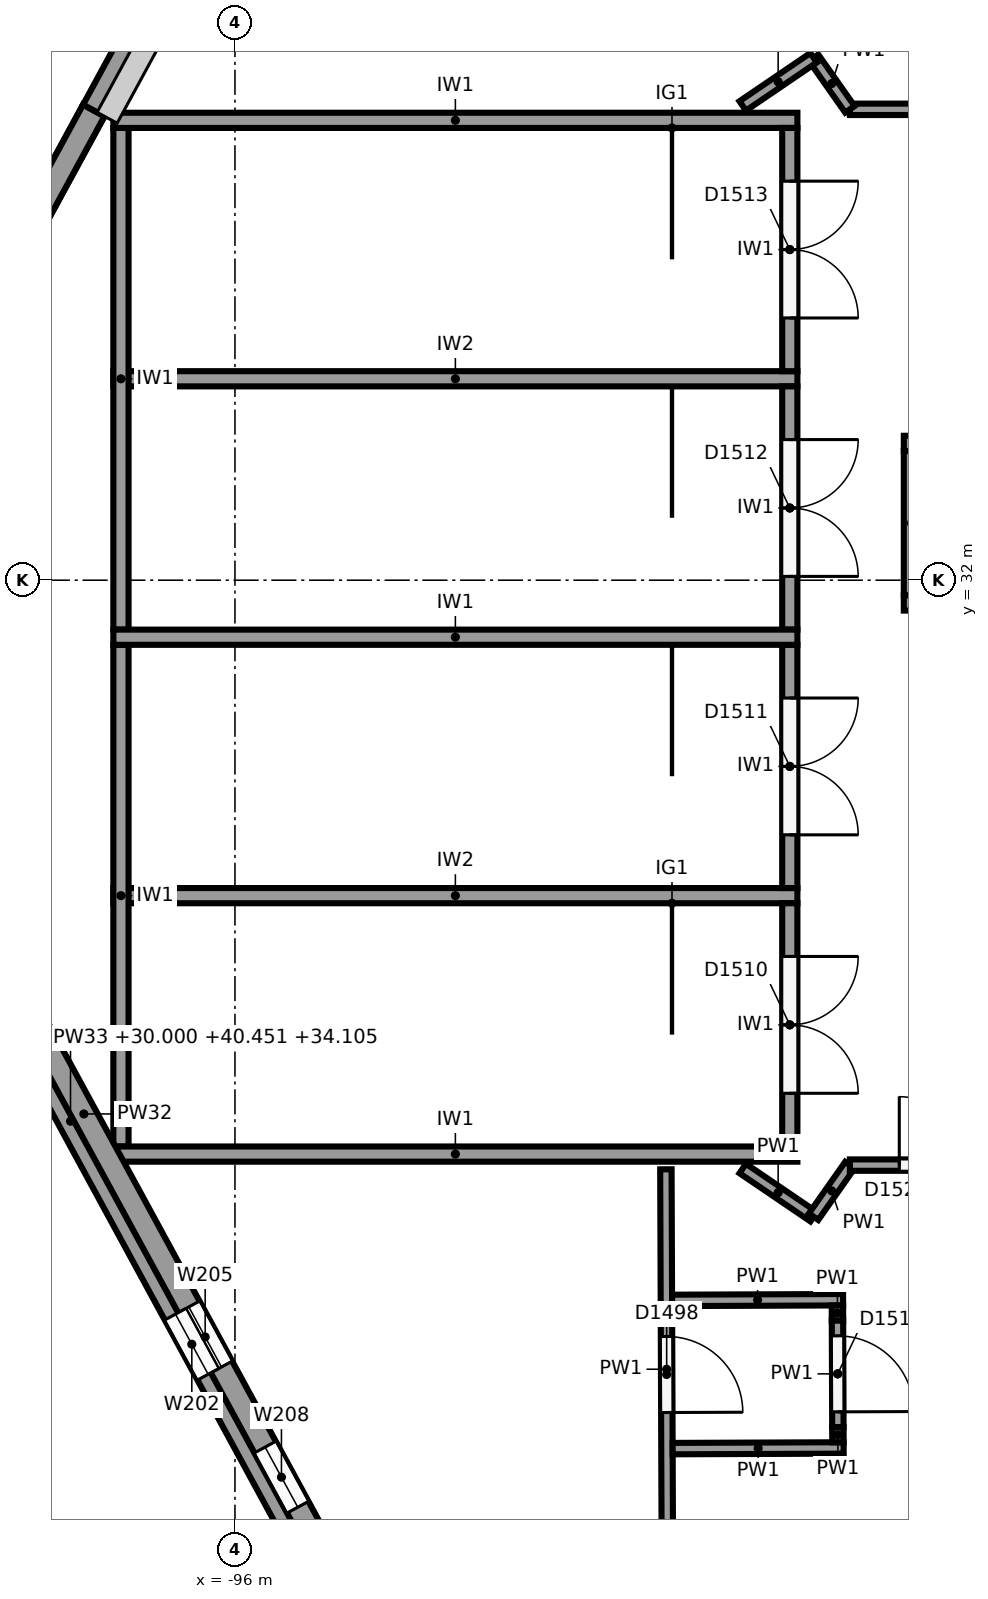
"""IFC4 building model, lengths in metres.
Left out: names, types, materials, properties, quantities, classifications, styles, units other than length and angle.
Written with IfcOpenShell. Run it as: python <this file> out.ifc"""

import sys

from ifc_helpers import new_model, si_unit, direction, frame, frame_2d, origin, place, context, subcontext, project, spatial, polyline, rectangle, outline, extrude, element, fill, save


model = new_model("IFC4")
c1 = context("Model", 3, precision=1e-05, world=origin(), true_north=direction((0.0, 1.0)))
c2 = subcontext(c1, "Body", "Model", "MODEL_VIEW")
j1 = project(units=[si_unit("LENGTHUNIT", "METRE"), si_unit("PLANEANGLEUNIT", "RADIAN")], contexts=[c1])
p1 = place(None, origin())
s1 = spatial("IfcSite", under=j1, at=p1, CompositionType="ELEMENT")
p2 = place(p1, origin())
s2 = spatial("IfcBuilding", under=s1, at=p2, CompositionType="ELEMENT")
p3 = place(p2, frame((0.0, 0.0, 24.0)))
s3 = spatial("IfcBuildingStorey", under=s2, at=p3, CompositionType="ELEMENT", Elevation=24.0)
p4 = place(p3, frame((-101.337, 31.785, 0.0), z_axis=(0.0, 0.0, 1.0), x_axis=(0.477865020076, 0.878433277255, 0.0)))
e1 = element("IfcWall", 1, at=p4, inside=s3, PredefinedType="SOLIDWALL", context=c2, shape_type="SweptSolid", body=[
    extrude(rectangle(XDim=7.28, YDim=0.32, at=frame_2d((3.64, 0.0))), origin(), (0.0, 0.0, 1.0), 6.0),
])
p5 = place(p4, frame((1.13, 0.0, 1.0)))
e2 = element("IfcOpeningElement", 2, at=p5, cuts=e1, PredefinedType="OPENING", context=c2, shape_type="SweptSolid", body=[
    extrude(rectangle(XDim=0.9, YDim=3.25, at=frame_2d((0.45, 1.625))), frame((0.0, 0.17, 0.0), z_axis=(0.0, -1.0, 0.0), x_axis=(1.0, 0.0, 0.0)), (0.0, 0.0, 1.0), 0.34),
])
p6 = place(p3, frame((-101.337, 31.785, 6.0), z_axis=(0.0, 0.0, 1.0), x_axis=(0.477865020076, 0.878433277255, 0.0)))
e3 = element("IfcWall", 3, at=p6, inside=s3, PredefinedType="SOLIDWALL", context=c2, shape_type="SweptSolid", body=[
    extrude(outline(polyline([(0.0, 0.0), (7.28, 0.0), (7.28, 6.972), (0.0, 10.451), (0.0, 0.0)])), frame((0.0, 0.16, 0.0), z_axis=(0.0, -1.0, 0.0), x_axis=(1.0, 0.0, 0.0)), (0.0, 0.0, 1.0), 0.32),
])
p7 = place(p6, frame((1.13, 0.0, 1.6)))
e4 = element("IfcOpeningElement", 4, at=p7, cuts=e3, PredefinedType="OPENING", context=c2, shape_type="SweptSolid", body=[
    extrude(rectangle(XDim=0.9, YDim=3.0, at=frame_2d((0.45, 1.5))), frame((0.0, 0.17, 0.0), z_axis=(0.0, -1.0, 0.0), x_axis=(1.0, 0.0, 0.0)), (0.0, 0.0, 1.0), 0.34),
])
p8 = place(p3, frame((-97.858, 38.18, 5.65), z_axis=(0.0, 0.0, 1.0), x_axis=(0.477871109227, 0.878429964747, 0.0)))
e5 = element("IfcWall", 5, at=p8, inside=s3, PredefinedType="SOLIDWALL", context=c2, shape_type="SweptSolid", body=[
    extrude(outline(polyline([(0.0, 0.0), (6.0, 0.0), (6.0, 4.455), (0.0, 7.322), (0.0, 0.0)])), frame((0.0, 0.16, 0.0), z_axis=(0.0, -1.0, 0.0), x_axis=(1.0, 0.0, 0.0)), (0.0, 0.0, 1.0), 0.32),
])
p9 = place(p3, frame((-94.815, 19.145, 0.0), z_axis=(0.0, 0.0, 1.0), x_axis=(-0.477867771117, 0.878431780691, 0.0)))
e6 = element("IfcWall", 6, at=p9, inside=s3, PredefinedType="SOLIDWALL", context=c2, shape_type="SweptSolid", body=[
    extrude(rectangle(XDim=13.28, YDim=0.32, at=frame_2d((6.64, 0.0))), origin(), (0.0, 0.0, 1.0), 6.0),
])
p10 = place(p9, frame((0.75, 0.0, 1.0)))
e7 = element("IfcOpeningElement", 7, at=p10, cuts=e6, PredefinedType="OPENING", context=c2, shape_type="SweptSolid", body=[
    extrude(rectangle(XDim=0.9, YDim=3.25, at=frame_2d((0.45, 1.625))), frame((0.0, 0.17, 0.0), z_axis=(0.0, -1.0, 0.0), x_axis=(1.0, 0.0, 0.0)), (0.0, 0.0, 1.0), 0.34),
])
p11 = place(p9, frame((2.85, 0.0, 1.0)))
e8 = element("IfcOpeningElement", 8, at=p11, cuts=e6, PredefinedType="OPENING", context=c2, shape_type="SweptSolid", body=[
    extrude(rectangle(XDim=0.9, YDim=3.25, at=frame_2d((0.45, 1.625))), frame((0.0, 0.17, 0.0), z_axis=(0.0, -1.0, 0.0), x_axis=(1.0, 0.0, 0.0)), (0.0, 0.0, 1.0), 0.34),
])
p12 = place(p9, frame((11.25, 0.0, 1.0)))
e9 = element("IfcOpeningElement", 9, at=p12, cuts=e6, PredefinedType="OPENING", context=c2, shape_type="SweptSolid", body=[
    extrude(rectangle(XDim=0.9, YDim=3.25, at=frame_2d((0.45, 1.625))), frame((0.0, 0.17, 0.0), z_axis=(0.0, -1.0, 0.0), x_axis=(1.0, 0.0, 0.0)), (0.0, 0.0, 1.0), 0.34),
])
p13 = place(p3, frame((-94.991, 19.05, 6.0), z_axis=(0.0, 0.0, 1.0), x_axis=(-0.477867771117, 0.878431780691, 0.0)))
e10 = element("IfcWall", 10, at=p13, inside=s3, PredefinedType="SOLIDWALL", context=c2, shape_type="SweptSolid", body=[
    extrude(outline(polyline([(0.0, 0.0), (13.28, 0.0), (13.28, 10.451), (0.0, 4.105), (0.0, 0.0)])), frame((0.0, 0.16, 0.0), z_axis=(0.0, -1.0, 0.0), x_axis=(1.0, 0.0, 0.0)), (0.0, 0.0, 1.0), 0.32),
])
p14 = place(p13, frame((2.85, 0.0, 1.6)))
e11 = element("IfcOpeningElement", 11, at=p14, cuts=e10, PredefinedType="OPENING", context=c2, shape_type="SweptSolid", body=[
    extrude(rectangle(XDim=0.9, YDim=3.0, at=frame_2d((0.45, 1.5))), frame((0.0, 0.17, 0.0), z_axis=(0.0, -1.0, 0.0), x_axis=(1.0, 0.0, 0.0)), (0.0, 0.0, 1.0), 0.34),
])
p15 = place(p13, frame((11.25, 0.0, 1.6)))
e12 = element("IfcOpeningElement", 12, at=p15, cuts=e10, PredefinedType="OPENING", context=c2, shape_type="SweptSolid", body=[
    extrude(rectangle(XDim=0.9, YDim=3.0, at=frame_2d((0.45, 1.5))), frame((0.0, 0.17, 0.0), z_axis=(0.0, -1.0, 0.0), x_axis=(1.0, 0.0, 0.0)), (0.0, 0.0, 1.0), 0.34),
])
for number, where, z_axis, x_axis in (
    (13, (-97.6, 38.05, 0.0), (0.0, 0.0, 1.0), (1.0, 0.0, 0.0)),
    (14, (-97.6, 31.25, 0.0), (0.0, 0.0, 1.0), (1.0, 0.0, 0.0)),
    (15, (-97.6, 24.45, 0.0), (0.0, 0.0, 1.0), (1.0, 0.0, 0.0)),
):
    element("IfcWall", number, at=place(p3, frame(where, z_axis=z_axis, x_axis=x_axis)), inside=s3, PredefinedType="SHEAR", context=c2, shape_type="SweptSolid", body=[
        extrude(rectangle(XDim=9.0, YDim=0.2, at=frame_2d((4.5, 0.0))), origin(), (0.0, 0.0, 1.0), 5.75),
    ])
for number, where, z_axis, x_axis in (
    (16, (-97.5, 37.95, 0.0), (0.0, 0.0, 1.0), (0.0, -1.0, 0.0)),
    (17, (-97.5, 31.15, 0.0), (0.0, 0.0, 1.0), (0.0, -1.0, 0.0)),
):
    element("IfcWall", number, at=place(p3, frame(where, z_axis=z_axis, x_axis=x_axis)), inside=s3, PredefinedType="SHEAR", context=c2, shape_type="SweptSolid", body=[
        extrude(rectangle(XDim=6.6, YDim=0.2, at=frame_2d((3.3, 0.0))), origin(), (0.0, 0.0, 1.0), 5.75),
    ])
for number, where, z_axis, x_axis in (
    (18, (-97.6, 34.65, 0.0), (0.0, 0.0, 1.0), (1.0, 0.0, 0.0)),
    (19, (-97.6, 27.85, 0.0), (0.0, 0.0, 1.0), (1.0, 0.0, 0.0)),
):
    element("IfcWall", number, at=place(p3, frame(where, z_axis=z_axis, x_axis=x_axis)), inside=s3, PredefinedType="SHEAR", context=c2, shape_type="SweptSolid", body=[
        extrude(rectangle(XDim=9.0, YDim=0.2, at=frame_2d((4.5, 0.0))), origin(), (0.0, 0.0, 1.0), 5.75),
    ])
p16 = place(p3, frame((-88.7, 37.95, 0.0), z_axis=(0.0, 0.0, 1.0), x_axis=(0.0, -1.0, 0.0)))
e20 = element("IfcWall", 20, at=p16, inside=s3, PredefinedType="SHEAR", context=c2, shape_type="SweptSolid", body=[
    extrude(rectangle(XDim=3.2, YDim=0.2, at=frame_2d((1.6, 0.0))), origin(), (0.0, 0.0, 1.0), 5.75),
])
p17 = place(p16, frame((0.7, 0.0, 0.0)))
e21 = element("IfcOpeningElement", 21, at=p17, cuts=e20, PredefinedType="OPENING", context=c2, shape_type="SweptSolid", body=[
    extrude(rectangle(XDim=1.8, YDim=2.1, at=frame_2d((0.9, 1.05))), frame((0.0, 0.11, 0.0), z_axis=(0.0, -1.0, 0.0), x_axis=(1.0, 0.0, 0.0)), (0.0, 0.0, 1.0), 0.22),
])
p18 = place(p3, frame((-88.7, 34.55, 0.0), z_axis=(0.0, 0.0, 1.0), x_axis=(0.0, -1.0, 0.0)))
e22 = element("IfcWall", 22, at=p18, inside=s3, PredefinedType="SHEAR", context=c2, shape_type="SweptSolid", body=[
    extrude(rectangle(XDim=3.2, YDim=0.2, at=frame_2d((1.6, 0.0))), origin(), (0.0, 0.0, 1.0), 5.75),
])
p19 = place(p18, frame((0.7, 0.0, 0.0)))
e23 = element("IfcOpeningElement", 23, at=p19, cuts=e22, PredefinedType="OPENING", context=c2, shape_type="SweptSolid", body=[
    extrude(rectangle(XDim=1.8, YDim=2.1, at=frame_2d((0.9, 1.05))), frame((0.0, 0.11, 0.0), z_axis=(0.0, -1.0, 0.0), x_axis=(1.0, 0.0, 0.0)), (0.0, 0.0, 1.0), 0.22),
])
p20 = place(p3, frame((-88.7, 31.15, 0.0), z_axis=(0.0, 0.0, 1.0), x_axis=(0.0, -1.0, 0.0)))
e24 = element("IfcWall", 24, at=p20, inside=s3, PredefinedType="SHEAR", context=c2, shape_type="SweptSolid", body=[
    extrude(rectangle(XDim=3.2, YDim=0.2, at=frame_2d((1.6, 0.0))), origin(), (0.0, 0.0, 1.0), 5.75),
])
p21 = place(p20, frame((0.7, 0.0, 0.0)))
e25 = element("IfcOpeningElement", 25, at=p21, cuts=e24, PredefinedType="OPENING", context=c2, shape_type="SweptSolid", body=[
    extrude(rectangle(XDim=1.8, YDim=2.1, at=frame_2d((0.9, 1.05))), frame((0.0, 0.11, 0.0), z_axis=(0.0, -1.0, 0.0), x_axis=(1.0, 0.0, 0.0)), (0.0, 0.0, 1.0), 0.22),
])
p22 = place(p3, frame((-88.7, 27.75, 0.0), z_axis=(0.0, 0.0, 1.0), x_axis=(0.0, -1.0, 0.0)))
e26 = element("IfcWall", 26, at=p22, inside=s3, PredefinedType="SHEAR", context=c2, shape_type="SweptSolid", body=[
    extrude(rectangle(XDim=3.2, YDim=0.2, at=frame_2d((1.6, 0.0))), origin(), (0.0, 0.0, 1.0), 5.75),
])
p23 = place(p22, frame((0.7, 0.0, 0.0)))
e27 = element("IfcOpeningElement", 27, at=p23, cuts=e26, PredefinedType="OPENING", context=c2, shape_type="SweptSolid", body=[
    extrude(rectangle(XDim=1.8, YDim=2.1, at=frame_2d((0.9, 1.05))), frame((0.0, 0.11, 0.0), z_axis=(0.0, -1.0, 0.0), x_axis=(1.0, 0.0, 0.0)), (0.0, 0.0, 1.0), 0.22),
])
for number, where, z_axis, x_axis in (
    (28, (-87.2, 33.8, 0.0), (0.0, 0.0, 1.0), (1.0, 0.0, 0.0)),
    (29, (-87.2, 31.7, 0.0), (0.0, 0.0, 1.0), (1.0, 0.0, 0.0)),
):
    element("IfcWall", number, at=place(p3, frame(where, z_axis=z_axis, x_axis=x_axis)), inside=s3, PredefinedType="SHEAR", context=c2, shape_type="SweptSolid", body=[
        extrude(rectangle(XDim=3.0, YDim=0.2, at=frame_2d((1.5, 0.0))), origin(), (0.0, 0.0, 1.0), 4.6),
    ])
p24 = place(p3, frame((-87.1, 33.7, 0.0), z_axis=(0.0, 0.0, 1.0), x_axis=(0.0, -1.0, 0.0)))
e30 = element("IfcWall", 30, at=p24, inside=s3, PredefinedType="SHEAR", context=c2, shape_type="SweptSolid", body=[
    extrude(rectangle(XDim=1.9, YDim=0.2, at=frame_2d((0.95, 0.0))), origin(), (0.0, 0.0, 1.0), 4.6),
])
p25 = place(p3, frame((-90.33, 24.25, 0.0), z_axis=(0.0, 0.0, 1.0), x_axis=(0.003805253437, -0.999992759997, 0.0)))
e31 = element("IfcWall", 31, at=p25, inside=s3, PredefinedType="PARTITIONING", context=c2, shape_type="SweptSolid", body=[
    extrude(rectangle(XDim=5.261, YDim=0.15, at=frame_2d((2.63, 0.0))), origin(), (0.0, 0.0, 1.0), 5.4),
])
p26 = place(p25, frame((2.2, 0.0, 0.0)))
e32 = element("IfcOpeningElement", 32, at=p26, cuts=e31, PredefinedType="OPENING", context=c2, shape_type="SweptSolid", body=[
    extrude(rectangle(XDim=1.0, YDim=2.1, at=frame_2d((0.5, 1.05))), frame((0.0, 0.085, 0.0), z_axis=(0.0, -1.0, 0.0), x_axis=(1.0, 0.0, 0.0)), (0.0, 0.0, 1.0), 0.17),
])
p27 = place(p3, frame((-89.32, 24.26, 0.0), z_axis=(0.0, 0.0, 1.0), x_axis=(0.827055308354, -0.562120553728, 0.0)))
e33 = element("IfcWall", 33, at=p27, inside=s3, PredefinedType="PARTITIONING", context=c2, shape_type="SweptSolid", body=[
    extrude(rectangle(XDim=1.128, YDim=0.15, at=frame_2d((0.564, 0.0))), origin(), (0.0, 0.0, 1.0), 5.4),
])
p28 = place(p3, frame((-88.387, 23.626, 0.0), z_axis=(0.0, 0.0, 1.0), x_axis=(0.575376756214, 0.817888493872, 0.0)))
e34 = element("IfcWall", 34, at=p28, inside=s3, PredefinedType="PARTITIONING", context=c2, shape_type="SweptSolid", body=[
    extrude(rectangle(XDim=0.83, YDim=0.15, at=frame_2d((0.415, 0.0))), origin(), (0.0, 0.0, 1.0), 5.4),
])
p29 = place(p3, frame((-87.909, 24.305, 0.0), z_axis=(0.0, 0.0, 1.0), x_axis=(1.0, 0.0, 0.0)))
e35 = element("IfcWall", 35, at=p29, inside=s3, PredefinedType="PARTITIONING", context=c2, shape_type="SweptSolid", body=[
    extrude(rectangle(XDim=3.704, YDim=0.15, at=frame_2d((1.852, 0.0))), origin(), (0.0, 0.0, 1.0), 5.4),
])
p30 = place(p29, frame((0.65, 0.0, 0.0)))
e36 = element("IfcOpeningElement", 36, at=p30, cuts=e35, PredefinedType="OPENING", context=c2, shape_type="SweptSolid", body=[
    extrude(rectangle(XDim=1.8, YDim=2.1, at=frame_2d((0.9, 1.05))), frame((0.0, 0.085, 0.0), z_axis=(0.0, -1.0, 0.0), x_axis=(1.0, 0.0, 0.0)), (0.0, 0.0, 1.0), 0.17),
])
p31 = place(p3, frame((-82.426, 38.195, 0.0), z_axis=(0.0, 0.0, 1.0), x_axis=(-1.0, 0.0, 0.0)))
e37 = element("IfcWall", 37, at=p31, inside=s3, PredefinedType="PARTITIONING", context=c2, shape_type="SweptSolid", body=[
    extrude(rectangle(XDim=5.483, YDim=0.15, at=frame_2d((2.741, 0.0))), origin(), (0.0, 0.0, 1.0), 5.4),
])
p32 = place(p31, frame((1.85, 0.0, 0.0)))
e38 = element("IfcOpeningElement", 38, at=p32, cuts=e37, PredefinedType="OPENING", context=c2, shape_type="SweptSolid", body=[
    extrude(rectangle(XDim=1.8, YDim=2.1, at=frame_2d((0.9, 1.05))), frame((0.0, 0.085, 0.0), z_axis=(0.0, -1.0, 0.0), x_axis=(1.0, 0.0, 0.0)), (0.0, 0.0, 1.0), 0.17),
])
p33 = place(p3, frame((-87.909, 38.195, 0.0), z_axis=(0.0, 0.0, 1.0), x_axis=(-0.575573582652, 0.81774999294, 0.0)))
e39 = element("IfcWall", 39, at=p33, inside=s3, PredefinedType="PARTITIONING", context=c2, shape_type="SweptSolid", body=[
    extrude(rectangle(XDim=0.83, YDim=0.15, at=frame_2d((0.415, 0.0))), origin(), (0.0, 0.0, 1.0), 5.4),
])
p34 = place(p3, frame((-88.387, 38.874, 0.0), z_axis=(0.0, 0.0, 1.0), x_axis=(-0.827055308354, -0.562120553728, 0.0)))
e40 = element("IfcWall", 40, at=p34, inside=s3, PredefinedType="PARTITIONING", context=c2, shape_type="SweptSolid", body=[
    extrude(rectangle(XDim=1.128, YDim=0.15, at=frame_2d((0.564, 0.0))), origin(), (0.0, 0.0, 1.0), 5.4),
])
for number, where, z_axis, x_axis in (
    (41, (-90.249, 22.525, 0.0), (0.0, 0.0, 1.0), (1.0, 0.004, 0.0)),
    (42, (-90.241, 20.575, 0.0), (0.0, 0.0, 1.0), (1.0, 0.004, 0.0)),
):
    element("IfcWall", number, at=place(p3, frame(where, z_axis=z_axis, x_axis=x_axis)), inside=s3, PredefinedType="PARTITIONING", context=c2, shape_type="SweptSolid", body=[
        extrude(rectangle(XDim=2.25, YDim=0.15, at=frame_2d((1.125, 0.0))), origin(), (0.0, 0.0, 1.0), 5.4),
    ])
p35 = place(p3, frame((-88.073, 22.458, 0.0), z_axis=(0.0, 0.0, 1.0), x_axis=(0.003662979089, -0.99999329127, 0.0)))
e43 = element("IfcWall", 43, at=p35, inside=s3, PredefinedType="PARTITIONING", context=c2, shape_type="SweptSolid", body=[
    extrude(rectangle(XDim=0.2, YDim=0.15, at=frame_2d((0.1, 0.0))), origin(), (0.0, 0.0, 1.0), 5.4),
])
p36 = place(p3, frame((-88.073, 22.259, 0.0), z_axis=(0.0, 0.0, 1.0), x_axis=(0.003836734927, -0.999992639705, 0.0)))
e44 = element("IfcWall", 44, at=p36, inside=s3, PredefinedType="PARTITIONING", context=c2, shape_type="SweptSolid", body=[
    extrude(rectangle(XDim=1.4, YDim=0.15, at=frame_2d((0.7, 0.0))), origin(), (0.0, 0.0, 1.0), 5.4),
])
p37 = place(p36, frame((0.2, 0.0, 0.0)))
e45 = element("IfcOpeningElement", 45, at=p37, cuts=e44, PredefinedType="OPENING", context=c2, shape_type="SweptSolid", body=[
    extrude(rectangle(XDim=1.0, YDim=2.1, at=frame_2d((0.5, 1.05))), frame((0.0, 0.085, 0.0), z_axis=(0.0, -1.0, 0.0), x_axis=(1.0, 0.0, 0.0)), (0.0, 0.0, 1.0), 0.17),
])
p38 = place(p3, frame((-88.067, 20.859, 0.0), z_axis=(0.0, 0.0, 1.0), x_axis=(0.003662979089, -0.99999329127, 0.0)))
e46 = element("IfcWall", 46, at=p38, inside=s3, PredefinedType="PARTITIONING", context=c2, shape_type="SweptSolid", body=[
    extrude(rectangle(XDim=0.2, YDim=0.15, at=frame_2d((0.1, 0.0))), origin(), (0.0, 0.0, 1.0), 5.4),
])
p39 = place(p10, origin())
e47 = element("IfcWindow", 47, at=p39, inside=s3, PartitioningType="SINGLE_PANEL", PredefinedType="WINDOW", context=c2, shape_type="SweptSolid", body=[
    extrude(rectangle(XDim=0.9, YDim=3.25, at=frame_2d((0.45, 1.625))), frame((0.0, 0.03, 0.0), z_axis=(0.0, -1.0, 0.0), x_axis=(1.0, 0.0, 0.0)), (0.0, 0.0, 1.0), 0.06),
])
fill(e7, e47)
p40 = place(p11, origin())
e48 = element("IfcWindow", 48, at=p40, inside=s3, PartitioningType="SINGLE_PANEL", PredefinedType="WINDOW", context=c2, shape_type="SweptSolid", body=[
    extrude(rectangle(XDim=0.9, YDim=3.25, at=frame_2d((0.45, 1.625))), frame((0.0, 0.03, 0.0), z_axis=(0.0, -1.0, 0.0), x_axis=(1.0, 0.0, 0.0)), (0.0, 0.0, 1.0), 0.06),
])
fill(e8, e48)
p41 = place(p14, origin())
e49 = element("IfcWindow", 49, at=p41, inside=s3, PartitioningType="SINGLE_PANEL", PredefinedType="WINDOW", context=c2, shape_type="SweptSolid", body=[
    extrude(rectangle(XDim=0.9, YDim=3.0, at=frame_2d((0.45, 1.5))), frame((0.0, 0.03, 0.0), z_axis=(0.0, -1.0, 0.0), x_axis=(1.0, 0.0, 0.0)), (0.0, 0.0, 1.0), 0.06),
])
fill(e11, e49)
p42 = place(p17, origin())
e50 = element("IfcDoor", 50, at=p42, inside=s3, OperationType="DOUBLE_DOOR_SINGLE_SWING", PredefinedType="DOOR", context=c2, shape_type="SweptSolid", body=[
    extrude(rectangle(XDim=1.8, YDim=2.1, at=frame_2d((0.9, 1.05))), frame((0.0, 0.025, 0.0), z_axis=(0.0, -1.0, 0.0), x_axis=(1.0, 0.0, 0.0)), (0.0, 0.0, 1.0), 0.05),
])
fill(e21, e50)
p43 = place(p19, origin())
e51 = element("IfcDoor", 51, at=p43, inside=s3, OperationType="DOUBLE_DOOR_SINGLE_SWING", PredefinedType="DOOR", context=c2, shape_type="SweptSolid", body=[
    extrude(rectangle(XDim=1.8, YDim=2.1, at=frame_2d((0.9, 1.05))), frame((0.0, 0.025, 0.0), z_axis=(0.0, -1.0, 0.0), x_axis=(1.0, 0.0, 0.0)), (0.0, 0.0, 1.0), 0.05),
])
fill(e23, e51)
p44 = place(p21, origin())
e52 = element("IfcDoor", 52, at=p44, inside=s3, OperationType="DOUBLE_DOOR_SINGLE_SWING", PredefinedType="DOOR", context=c2, shape_type="SweptSolid", body=[
    extrude(rectangle(XDim=1.8, YDim=2.1, at=frame_2d((0.9, 1.05))), frame((0.0, 0.025, 0.0), z_axis=(0.0, -1.0, 0.0), x_axis=(1.0, 0.0, 0.0)), (0.0, 0.0, 1.0), 0.05),
])
fill(e25, e52)
p45 = place(p23, origin())
e53 = element("IfcDoor", 53, at=p45, inside=s3, OperationType="DOUBLE_DOOR_SINGLE_SWING", PredefinedType="DOOR", context=c2, shape_type="SweptSolid", body=[
    extrude(rectangle(XDim=1.8, YDim=2.1, at=frame_2d((0.9, 1.05))), frame((0.0, 0.025, 0.0), z_axis=(0.0, -1.0, 0.0), x_axis=(1.0, 0.0, 0.0)), (0.0, 0.0, 1.0), 0.05),
])
fill(e27, e53)
p46 = place(p26, origin())
e54 = element("IfcDoor", 54, at=p46, inside=s3, OperationType="SINGLE_SWING_RIGHT", PredefinedType="DOOR", context=c2, shape_type="SweptSolid", body=[
    extrude(rectangle(XDim=1.0, YDim=2.1, at=frame_2d((0.5, 1.05))), frame((0.0, 0.025, 0.0), z_axis=(0.0, -1.0, 0.0), x_axis=(1.0, 0.0, 0.0)), (0.0, 0.0, 1.0), 0.05),
])
fill(e32, e54)
p47 = place(p30, origin())
e55 = element("IfcDoor", 55, at=p47, inside=s3, OperationType="DOUBLE_DOOR_SINGLE_SWING", PredefinedType="DOOR", context=c2, shape_type="SweptSolid", body=[
    extrude(rectangle(XDim=1.8, YDim=2.1, at=frame_2d((0.9, 1.05))), frame((0.0, 0.025, 0.0), z_axis=(0.0, -1.0, 0.0), x_axis=(1.0, 0.0, 0.0)), (0.0, 0.0, 1.0), 0.05),
])
fill(e36, e55)
p48 = place(p37, origin())
e56 = element("IfcDoor", 56, at=p48, inside=s3, OperationType="SINGLE_SWING_RIGHT", PredefinedType="DOOR", context=c2, shape_type="SweptSolid", body=[
    extrude(rectangle(XDim=1.0, YDim=2.1, at=frame_2d((0.5, 1.05))), frame((0.0, 0.025, 0.0), z_axis=(0.0, -1.0, 0.0), x_axis=(1.0, 0.0, 0.0)), (0.0, 0.0, 1.0), 0.05),
])
fill(e45, e56)
save(model, sys.argv[1])
